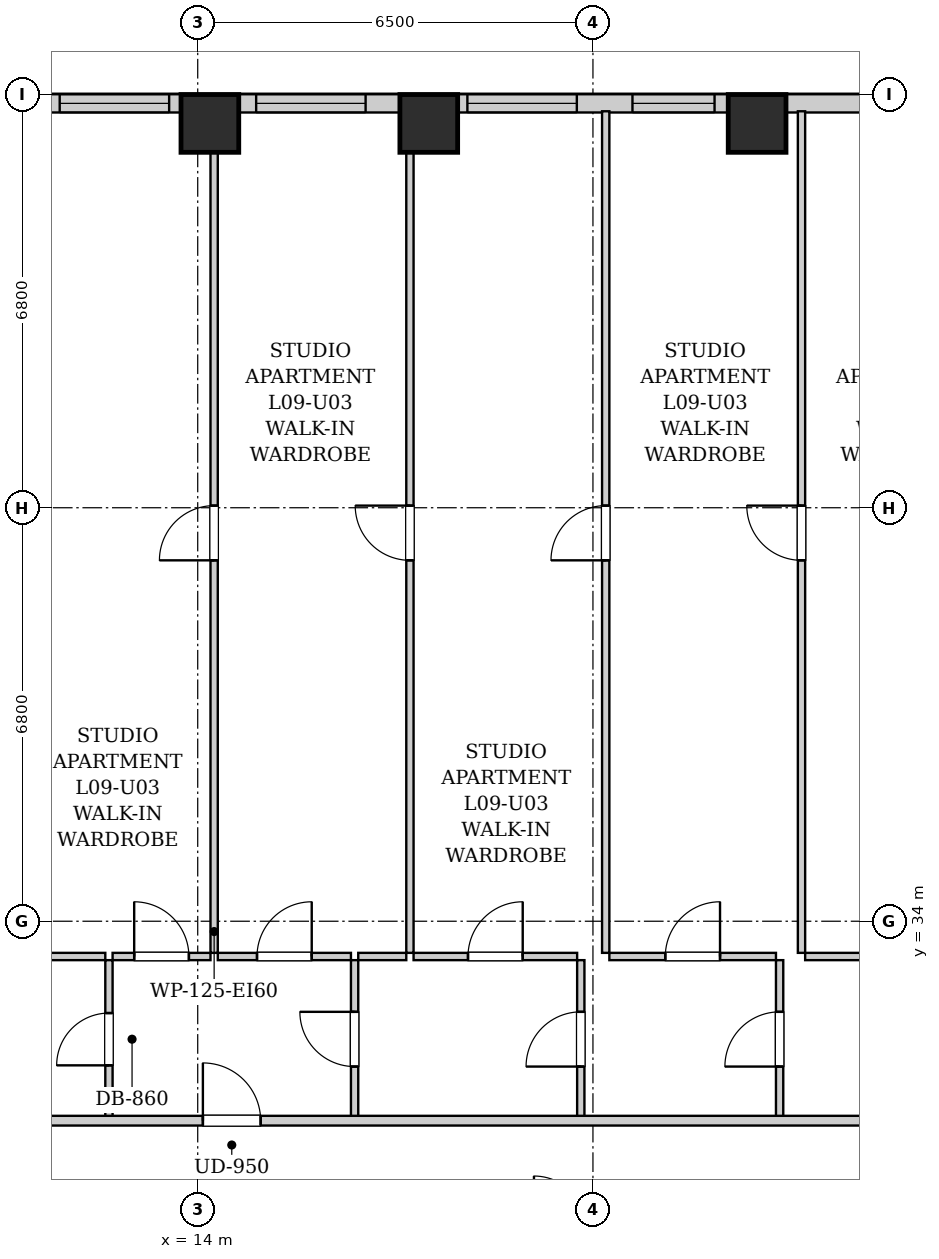
"""IFC4 building model, lengths in metres.
Left out: names, types, materials, properties, quantities, classifications, styles, units other than length and angle.
Written with IfcOpenShell. Run it as: python <this file> out.ifc"""

import sys

from ifc_helpers import new_model, si_unit, direction, frame, frame_2d, origin, origin_2d, place, context, subcontext, project, spatial, rectangle, extrude, element, fill, save


model = new_model("IFC4")
c1 = context("Model", 3, precision=1e-05, world=origin(), true_north=direction((0.0, 1.0)))
c2 = subcontext(c1, "Body", "Model", "MODEL_VIEW")
j1 = project(units=[si_unit("LENGTHUNIT", "METRE"), si_unit("PLANEANGLEUNIT", "RADIAN")], contexts=[c1])
p1 = place(None, origin())
s1 = spatial("IfcSite", under=j1, at=p1, CompositionType="ELEMENT")
p2 = place(p1, origin())
s2 = spatial("IfcBuilding", under=s1, at=p2, CompositionType="ELEMENT")
p3 = place(p2, frame((0.0, 0.0, 38.6)))
s3 = spatial("IfcBuildingStorey", under=s2, at=p3, CompositionType="ELEMENT", Elevation=38.6)
for number, where, z_axis, x_axis in (
    (1, (14.2, 47.12, 0.0), (0.0, 0.0, 1.0), (1.0, 0.0, 0.0)),
    (2, (17.8, 47.12, 0.0), (0.0, 0.0, 1.0), (1.0, 0.0, 0.0)),
    (3, (23.2, 47.12, 0.0), (0.0, 0.0, 1.0), (1.0, 0.0, 0.0)),
):
    element("IfcColumn", number, at=place(p3, frame(where, z_axis=z_axis, x_axis=x_axis)), inside=s3, PredefinedType="COLUMN", context=c2, shape_type="SweptSolid", body=[
        extrude(rectangle(XDim=0.95, YDim=0.95, at=origin_2d()), origin(), (0.0, 0.0, 1.0), 3.2),
    ])
p4 = place(p3, frame((10.0, 47.45, 0.0), z_axis=(0.0, 0.0, 1.0), x_axis=(1.0, 0.0, 0.0)))
e4 = element("IfcWall", 4, at=p4, inside=s3, PredefinedType="SOLIDWALL", context=c2, shape_type="SweptSolid", body=[
    extrude(rectangle(XDim=25.7, YDim=0.3, at=frame_2d((12.85, 0.0))), origin(), (0.0, 0.0, 1.0), 1.975),
])
p5 = place(p4, frame((1.73, 0.0, 0.55)))
e5 = element("IfcOpeningElement", 5, at=p5, cuts=e4, PredefinedType="OPENING", context=c2, shape_type="SweptSolid", body=[
    extrude(rectangle(XDim=1.8, YDim=1.2, at=frame_2d((0.9, 0.6))), frame((0.0, 0.16, 0.0), z_axis=(0.0, -1.0, 0.0), x_axis=(1.0, 0.0, 0.0)), (0.0, 0.0, 1.0), 0.32),
])
p6 = place(p4, frame((4.961, 0.0, 0.55)))
e6 = element("IfcOpeningElement", 6, at=p6, cuts=e4, PredefinedType="OPENING", context=c2, shape_type="SweptSolid", body=[
    extrude(rectangle(XDim=1.8, YDim=1.2, at=frame_2d((0.9, 0.6))), frame((0.0, 0.16, 0.0), z_axis=(0.0, -1.0, 0.0), x_axis=(1.0, 0.0, 0.0)), (0.0, 0.0, 1.0), 0.32),
])
p7 = place(p4, frame((8.435, 0.0, 0.55)))
e7 = element("IfcOpeningElement", 7, at=p7, cuts=e4, PredefinedType="OPENING", context=c2, shape_type="SweptSolid", body=[
    extrude(rectangle(XDim=1.8, YDim=1.2, at=frame_2d((0.9, 0.6))), frame((0.0, 0.16, 0.0), z_axis=(0.0, -1.0, 0.0), x_axis=(1.0, 0.0, 0.0)), (0.0, 0.0, 1.0), 0.32),
])
p8 = place(p4, frame((11.15, 0.0, 0.55)))
e8 = element("IfcOpeningElement", 8, at=p8, cuts=e4, PredefinedType="OPENING", context=c2, shape_type="SweptSolid", body=[
    extrude(rectangle(XDim=1.35, YDim=1.2, at=frame_2d((0.675, 0.6))), frame((0.0, 0.16, 0.0), z_axis=(0.0, -1.0, 0.0), x_axis=(1.0, 0.0, 0.0)), (0.0, 0.0, 1.0), 0.32),
])
p9 = place(p4, frame((17.812, 0.0, 0.55)))
e9 = element("IfcOpeningElement", 9, at=p9, cuts=e4, PredefinedType="OPENING", context=c2, shape_type="SweptSolid", body=[
    extrude(rectangle(XDim=1.8, YDim=1.2, at=frame_2d((0.9, 0.6))), frame((0.0, 0.16, 0.0), z_axis=(0.0, -1.0, 0.0), x_axis=(1.0, 0.0, 0.0)), (0.0, 0.0, 1.0), 0.32),
])
p10 = place(p4, frame((20.765, 0.0, 0.55)))
e10 = element("IfcOpeningElement", 10, at=p10, cuts=e4, PredefinedType="OPENING", context=c2, shape_type="SweptSolid", body=[
    extrude(rectangle(XDim=1.8, YDim=1.2, at=frame_2d((0.9, 0.6))), frame((0.0, 0.16, 0.0), z_axis=(0.0, -1.0, 0.0), x_axis=(1.0, 0.0, 0.0)), (0.0, 0.0, 1.0), 0.32),
])
p11 = place(p4, frame((23.835, 0.0, 0.55)))
e11 = element("IfcOpeningElement", 11, at=p11, cuts=e4, PredefinedType="OPENING", context=c2, shape_type="SweptSolid", body=[
    extrude(rectangle(XDim=1.35, YDim=1.2, at=frame_2d((0.675, 0.6))), frame((0.0, 0.16, 0.0), z_axis=(0.0, -1.0, 0.0), x_axis=(1.0, 0.0, 0.0)), (0.0, 0.0, 1.0), 0.32),
])
p12 = place(p3, frame((12.54, 30.76, 0.0), z_axis=(0.0, 0.0, 1.0), x_axis=(0.0, 1.0, 0.0)))
e12 = element("IfcWall", 12, at=p12, inside=s3, PredefinedType="PARTITIONING", context=c2, shape_type="SweptSolid", body=[
    extrude(rectangle(XDim=2.6, YDim=0.12, at=frame_2d((1.3, 0.0))), origin(), (0.0, 0.0, 1.0), 2.94),
])
p13 = place(p12, frame((0.87, 0.0, 0.0)))
e13 = element("IfcOpeningElement", 13, at=p13, cuts=e12, PredefinedType="OPENING", context=c2, shape_type="SweptSolid", body=[
    extrude(rectangle(XDim=0.86, YDim=2.05, at=frame_2d((0.43, 1.025))), frame((0.0, 0.07, 0.0), z_axis=(0.0, -1.0, 0.0), x_axis=(1.0, 0.0, 0.0)), (0.0, 0.0, 1.0), 0.14),
])
p14 = place(p3, frame((11.11, 33.42, 0.0), z_axis=(0.0, 0.0, 1.0), x_axis=(1.0, 0.0, 0.0)))
e14 = element("IfcWall", 14, at=p14, inside=s3, PredefinedType="PARTITIONING", context=c2, shape_type="SweptSolid", body=[
    extrude(rectangle(XDim=1.37, YDim=0.12, at=frame_2d((0.685, 0.0))), origin(), (0.0, 0.0, 1.0), 2.94),
])
p15 = place(p3, frame((16.58, 30.76, 0.0), z_axis=(0.0, 0.0, 1.0), x_axis=(0.0, 1.0, 0.0)))
e15 = element("IfcWall", 15, at=p15, inside=s3, PredefinedType="PARTITIONING", context=c2, shape_type="SweptSolid", body=[
    extrude(rectangle(XDim=2.6, YDim=0.12, at=frame_2d((1.3, 0.0))), origin(), (0.0, 0.0, 1.0), 2.94),
])
p16 = place(p15, frame((0.85, 0.0, 0.0)))
e16 = element("IfcOpeningElement", 16, at=p16, cuts=e15, PredefinedType="OPENING", context=c2, shape_type="SweptSolid", body=[
    extrude(rectangle(XDim=0.9, YDim=2.05, at=frame_2d((0.45, 1.025))), frame((0.0, 0.07, 0.0), z_axis=(0.0, -1.0, 0.0), x_axis=(1.0, 0.0, 0.0)), (0.0, 0.0, 1.0), 0.14),
])
p17 = place(p3, frame((12.6, 33.42, 0.0), z_axis=(0.0, 0.0, 1.0), x_axis=(1.0, 0.0, 0.0)))
e17 = element("IfcWall", 17, at=p17, inside=s3, PredefinedType="PARTITIONING", context=c2, shape_type="SweptSolid", body=[
    extrude(rectangle(XDim=1.61, YDim=0.12, at=frame_2d((0.805, 0.0))), origin(), (0.0, 0.0, 1.0), 2.94),
])
p18 = place(p17, frame((0.355, 0.0, 0.0)))
e18 = element("IfcOpeningElement", 18, at=p18, cuts=e17, PredefinedType="OPENING", context=c2, shape_type="SweptSolid", body=[
    extrude(rectangle(XDim=0.9, YDim=2.05, at=frame_2d((0.45, 1.025))), frame((0.0, 0.07, 0.0), z_axis=(0.0, -1.0, 0.0), x_axis=(1.0, 0.0, 0.0)), (0.0, 0.0, 1.0), 0.14),
])
p19 = place(p3, frame((14.33, 33.42, 0.0), z_axis=(0.0, 0.0, 1.0), x_axis=(1.0, 0.0, 0.0)))
e19 = element("IfcWall", 19, at=p19, inside=s3, PredefinedType="PARTITIONING", context=c2, shape_type="SweptSolid", body=[
    extrude(rectangle(XDim=2.19, YDim=0.12, at=frame_2d((1.095, 0.0))), origin(), (0.0, 0.0, 1.0), 2.94),
])
p20 = place(p19, frame((0.645, 0.0, 0.0)))
e20 = element("IfcOpeningElement", 20, at=p20, cuts=e19, PredefinedType="OPENING", context=c2, shape_type="SweptSolid", body=[
    extrude(rectangle(XDim=0.9, YDim=2.05, at=frame_2d((0.45, 1.025))), frame((0.0, 0.07, 0.0), z_axis=(0.0, -1.0, 0.0), x_axis=(1.0, 0.0, 0.0)), (0.0, 0.0, 1.0), 0.14),
])
p21 = place(p3, frame((20.3, 30.76, 0.0), z_axis=(0.0, 0.0, 1.0), x_axis=(0.0, 1.0, 0.0)))
e21 = element("IfcWall", 21, at=p21, inside=s3, PredefinedType="PARTITIONING", context=c2, shape_type="SweptSolid", body=[
    extrude(rectangle(XDim=2.6, YDim=0.12, at=frame_2d((1.3, 0.0))), origin(), (0.0, 0.0, 1.0), 2.94),
])
p22 = place(p21, frame((0.85, 0.0, 0.0)))
e22 = element("IfcOpeningElement", 22, at=p22, cuts=e21, PredefinedType="OPENING", context=c2, shape_type="SweptSolid", body=[
    extrude(rectangle(XDim=0.9, YDim=2.05, at=frame_2d((0.45, 1.025))), frame((0.0, 0.07, 0.0), z_axis=(0.0, -1.0, 0.0), x_axis=(1.0, 0.0, 0.0)), (0.0, 0.0, 1.0), 0.14),
])
p23 = place(p3, frame((16.64, 33.42, 0.0), z_axis=(0.0, 0.0, 1.0), x_axis=(1.0, 0.0, 0.0)))
e23 = element("IfcWall", 23, at=p23, inside=s3, PredefinedType="PARTITIONING", context=c2, shape_type="SweptSolid", body=[
    extrude(rectangle(XDim=0.79, YDim=0.12, at=frame_2d((0.395, 0.0))), origin(), (0.0, 0.0, 1.0), 2.94),
])
p24 = place(p3, frame((17.55, 33.42, 0.0), z_axis=(0.0, 0.0, 1.0), x_axis=(1.0, 0.0, 0.0)))
e24 = element("IfcWall", 24, at=p24, inside=s3, PredefinedType="PARTITIONING", context=c2, shape_type="SweptSolid", body=[
    extrude(rectangle(XDim=2.69, YDim=0.12, at=frame_2d((1.345, 0.0))), origin(), (0.0, 0.0, 1.0), 2.94),
])
p25 = place(p24, frame((0.895, 0.0, 0.0)))
e25 = element("IfcOpeningElement", 25, at=p25, cuts=e24, PredefinedType="OPENING", context=c2, shape_type="SweptSolid", body=[
    extrude(rectangle(XDim=0.9, YDim=2.05, at=frame_2d((0.45, 1.025))), frame((0.0, 0.07, 0.0), z_axis=(0.0, -1.0, 0.0), x_axis=(1.0, 0.0, 0.0)), (0.0, 0.0, 1.0), 0.14),
])
p26 = place(p3, frame((23.57, 30.76, 0.0), z_axis=(0.0, 0.0, 1.0), x_axis=(0.0, 1.0, 0.0)))
e26 = element("IfcWall", 26, at=p26, inside=s3, PredefinedType="PARTITIONING", context=c2, shape_type="SweptSolid", body=[
    extrude(rectangle(XDim=2.6, YDim=0.12, at=frame_2d((1.3, 0.0))), origin(), (0.0, 0.0, 1.0), 2.94),
])
p27 = place(p26, frame((0.85, 0.0, 0.0)))
e27 = element("IfcOpeningElement", 27, at=p27, cuts=e26, PredefinedType="OPENING", context=c2, shape_type="SweptSolid", body=[
    extrude(rectangle(XDim=0.9, YDim=2.05, at=frame_2d((0.45, 1.025))), frame((0.0, 0.07, 0.0), z_axis=(0.0, -1.0, 0.0), x_axis=(1.0, 0.0, 0.0)), (0.0, 0.0, 1.0), 0.14),
])
p28 = place(p3, frame((20.77, 33.42, 0.0), z_axis=(0.0, 0.0, 1.0), x_axis=(1.0, 0.0, 0.0)))
e28 = element("IfcWall", 28, at=p28, inside=s3, PredefinedType="PARTITIONING", context=c2, shape_type="SweptSolid", body=[
    extrude(rectangle(XDim=2.74, YDim=0.12, at=frame_2d((1.37, 0.0))), origin(), (0.0, 0.0, 1.0), 2.94),
])
p29 = place(p28, frame((0.92, 0.0, 0.0)))
e29 = element("IfcOpeningElement", 29, at=p29, cuts=e28, PredefinedType="OPENING", context=c2, shape_type="SweptSolid", body=[
    extrude(rectangle(XDim=0.9, YDim=2.05, at=frame_2d((0.45, 1.025))), frame((0.0, 0.07, 0.0), z_axis=(0.0, -1.0, 0.0), x_axis=(1.0, 0.0, 0.0)), (0.0, 0.0, 1.0), 0.14),
])
p30 = place(p3, frame((23.99, 33.42, 0.0), z_axis=(0.0, 0.0, 1.0), x_axis=(1.0, 0.0, 0.0)))
e30 = element("IfcWall", 30, at=p30, inside=s3, PredefinedType="PARTITIONING", context=c2, shape_type="SweptSolid", body=[
    extrude(rectangle(XDim=3.1, YDim=0.12, at=frame_2d((1.55, 0.0))), origin(), (0.0, 0.0, 1.0), 2.94),
])
p31 = place(p30, frame((1.1, 0.0, 0.0)))
e31 = element("IfcOpeningElement", 31, at=p31, cuts=e30, PredefinedType="OPENING", context=c2, shape_type="SweptSolid", body=[
    extrude(rectangle(XDim=0.9, YDim=2.05, at=frame_2d((0.45, 1.025))), frame((0.0, 0.07, 0.0), z_axis=(0.0, -1.0, 0.0), x_axis=(1.0, 0.0, 0.0)), (0.0, 0.0, 1.0), 0.14),
])
p32 = place(p3, frame((14.27, 33.48, 0.0), z_axis=(0.0, 0.0, 1.0), x_axis=(0.0, 1.0, 0.0)))
e32 = element("IfcWall", 32, at=p32, inside=s3, PredefinedType="PARTITIONING", context=c2, shape_type="SweptSolid", body=[
    extrude(rectangle(XDim=13.84, YDim=0.12, at=frame_2d((6.92, 0.0))), origin(), (0.0, 0.0, 1.0), 2.94),
])
p33 = place(p32, frame((6.455, 0.0, 0.0)))
e33 = element("IfcOpeningElement", 33, at=p33, cuts=e32, PredefinedType="OPENING", context=c2, shape_type="SweptSolid", body=[
    extrude(rectangle(XDim=0.9, YDim=2.05, at=frame_2d((0.45, 1.025))), frame((0.0, 0.07, 0.0), z_axis=(0.0, -1.0, 0.0), x_axis=(1.0, 0.0, 0.0)), (0.0, 0.0, 1.0), 0.14),
])
p34 = place(p3, frame((17.49, 33.48, 0.0), z_axis=(0.0, 0.0, 1.0), x_axis=(0.0, 1.0, 0.0)))
e34 = element("IfcWall", 34, at=p34, inside=s3, PredefinedType="PARTITIONING", context=c2, shape_type="SweptSolid", body=[
    extrude(rectangle(XDim=13.84, YDim=0.12, at=frame_2d((6.92, 0.0))), origin(), (0.0, 0.0, 1.0), 2.94),
])
p35 = place(p34, frame((6.455, 0.0, 0.0)))
e35 = element("IfcOpeningElement", 35, at=p35, cuts=e34, PredefinedType="OPENING", context=c2, shape_type="SweptSolid", body=[
    extrude(rectangle(XDim=0.9, YDim=2.05, at=frame_2d((0.45, 1.025))), frame((0.0, 0.07, 0.0), z_axis=(0.0, -1.0, 0.0), x_axis=(1.0, 0.0, 0.0)), (0.0, 0.0, 1.0), 0.14),
])
p36 = place(p3, frame((20.71, 33.48, 0.0), z_axis=(0.0, 0.0, 1.0), x_axis=(0.0, 1.0, 0.0)))
e36 = element("IfcWall", 36, at=p36, inside=s3, PredefinedType="PARTITIONING", context=c2, shape_type="SweptSolid", body=[
    extrude(rectangle(XDim=13.84, YDim=0.12, at=frame_2d((6.92, 0.0))), origin(), (0.0, 0.0, 1.0), 2.94),
])
p37 = place(p36, frame((6.455, 0.0, 0.0)))
e37 = element("IfcOpeningElement", 37, at=p37, cuts=e36, PredefinedType="OPENING", context=c2, shape_type="SweptSolid", body=[
    extrude(rectangle(XDim=0.9, YDim=2.05, at=frame_2d((0.45, 1.025))), frame((0.0, 0.07, 0.0), z_axis=(0.0, -1.0, 0.0), x_axis=(1.0, 0.0, 0.0)), (0.0, 0.0, 1.0), 0.14),
])
p38 = place(p3, frame((23.93, 33.48, 0.0), z_axis=(0.0, 0.0, 1.0), x_axis=(0.0, 1.0, 0.0)))
e38 = element("IfcWall", 38, at=p38, inside=s3, PredefinedType="PARTITIONING", context=c2, shape_type="SweptSolid", body=[
    extrude(rectangle(XDim=13.84, YDim=0.12, at=frame_2d((6.92, 0.0))), origin(), (0.0, 0.0, 1.0), 2.94),
])
p39 = place(p38, frame((6.455, 0.0, 0.0)))
e39 = element("IfcOpeningElement", 39, at=p39, cuts=e38, PredefinedType="OPENING", context=c2, shape_type="SweptSolid", body=[
    extrude(rectangle(XDim=0.9, YDim=2.05, at=frame_2d((0.45, 1.025))), frame((0.0, 0.07, 0.0), z_axis=(0.0, -1.0, 0.0), x_axis=(1.0, 0.0, 0.0)), (0.0, 0.0, 1.0), 0.14),
])
p40 = place(p3, frame((10.05, 30.72, 0.0), z_axis=(0.0, 0.0, 1.0), x_axis=(1.0, 0.0, 0.0)))
e40 = element("IfcWall", 40, at=p40, inside=s3, PredefinedType="PARTITIONING", context=c2, shape_type="SweptSolid", body=[
    extrude(rectangle(XDim=33.9, YDim=0.16, at=frame_2d((16.95, 0.0))), origin(), (0.0, 0.0, 1.0), 2.94),
])
p41 = place(p40, frame((4.035, 0.0, 0.0)))
e41 = element("IfcOpeningElement", 41, at=p41, cuts=e40, PredefinedType="OPENING", context=c2, shape_type="SweptSolid", body=[
    extrude(rectangle(XDim=0.95, YDim=2.1, at=frame_2d((0.475, 1.05))), frame((0.0, 0.09, 0.0), z_axis=(0.0, -1.0, 0.0), x_axis=(1.0, 0.0, 0.0)), (0.0, 0.0, 1.0), 0.18),
])
p42 = place(p13, origin())
e42 = element("IfcDoor", 42, at=p42, inside=s3, OperationType="SINGLE_SWING_LEFT", PredefinedType="DOOR", context=c2, shape_type="SweptSolid", body=[
    extrude(rectangle(XDim=0.86, YDim=2.05, at=frame_2d((0.43, 1.025))), frame((0.0, 0.025, 0.0), z_axis=(0.0, -1.0, 0.0), x_axis=(1.0, 0.0, 0.0)), (0.0, 0.0, 1.0), 0.05),
])
fill(e13, e42)
p43 = place(p16, origin())
e43 = element("IfcDoor", 43, at=p43, inside=s3, OperationType="SINGLE_SWING_RIGHT", PredefinedType="DOOR", context=c2, shape_type="SweptSolid", body=[
    extrude(rectangle(XDim=0.9, YDim=2.05, at=frame_2d((0.45, 1.025))), frame((0.0, 0.025, 0.0), z_axis=(0.0, -1.0, 0.0), x_axis=(1.0, 0.0, 0.0)), (0.0, 0.0, 1.0), 0.05),
])
fill(e16, e43)
p44 = place(p18, origin())
e44 = element("IfcDoor", 44, at=p44, inside=s3, OperationType="SINGLE_SWING_LEFT", PredefinedType="DOOR", context=c2, shape_type="SweptSolid", body=[
    extrude(rectangle(XDim=0.9, YDim=2.05, at=frame_2d((0.45, 1.025))), frame((0.0, 0.025, 0.0), z_axis=(0.0, -1.0, 0.0), x_axis=(1.0, 0.0, 0.0)), (0.0, 0.0, 1.0), 0.05),
])
fill(e18, e44)
p45 = place(p20, origin())
e45 = element("IfcDoor", 45, at=p45, inside=s3, OperationType="SINGLE_SWING_RIGHT", PredefinedType="DOOR", context=c2, shape_type="SweptSolid", body=[
    extrude(rectangle(XDim=0.9, YDim=2.05, at=frame_2d((0.45, 1.025))), frame((0.0, 0.025, 0.0), z_axis=(0.0, -1.0, 0.0), x_axis=(1.0, 0.0, 0.0)), (0.0, 0.0, 1.0), 0.05),
])
fill(e20, e45)
p46 = place(p22, origin())
e46 = element("IfcDoor", 46, at=p46, inside=s3, OperationType="SINGLE_SWING_LEFT", PredefinedType="DOOR", context=c2, shape_type="SweptSolid", body=[
    extrude(rectangle(XDim=0.9, YDim=2.05, at=frame_2d((0.45, 1.025))), frame((0.0, 0.025, 0.0), z_axis=(0.0, -1.0, 0.0), x_axis=(1.0, 0.0, 0.0)), (0.0, 0.0, 1.0), 0.05),
])
fill(e22, e46)
p47 = place(p25, origin())
e47 = element("IfcDoor", 47, at=p47, inside=s3, OperationType="SINGLE_SWING_RIGHT", PredefinedType="DOOR", context=c2, shape_type="SweptSolid", body=[
    extrude(rectangle(XDim=0.9, YDim=2.05, at=frame_2d((0.45, 1.025))), frame((0.0, 0.025, 0.0), z_axis=(0.0, -1.0, 0.0), x_axis=(1.0, 0.0, 0.0)), (0.0, 0.0, 1.0), 0.05),
])
fill(e25, e47)
p48 = place(p27, origin())
e48 = element("IfcDoor", 48, at=p48, inside=s3, OperationType="SINGLE_SWING_LEFT", PredefinedType="DOOR", context=c2, shape_type="SweptSolid", body=[
    extrude(rectangle(XDim=0.9, YDim=2.05, at=frame_2d((0.45, 1.025))), frame((0.0, 0.025, 0.0), z_axis=(0.0, -1.0, 0.0), x_axis=(1.0, 0.0, 0.0)), (0.0, 0.0, 1.0), 0.05),
])
fill(e27, e48)
p49 = place(p29, origin())
e49 = element("IfcDoor", 49, at=p49, inside=s3, OperationType="SINGLE_SWING_RIGHT", PredefinedType="DOOR", context=c2, shape_type="SweptSolid", body=[
    extrude(rectangle(XDim=0.9, YDim=2.05, at=frame_2d((0.45, 1.025))), frame((0.0, 0.025, 0.0), z_axis=(0.0, -1.0, 0.0), x_axis=(1.0, 0.0, 0.0)), (0.0, 0.0, 1.0), 0.05),
])
fill(e29, e49)
p50 = place(p33, origin())
e50 = element("IfcDoor", 50, at=p50, inside=s3, OperationType="SINGLE_SWING_LEFT", PredefinedType="DOOR", context=c2, shape_type="SweptSolid", body=[
    extrude(rectangle(XDim=0.9, YDim=2.05, at=frame_2d((0.45, 1.025))), frame((0.0, 0.025, 0.0), z_axis=(0.0, -1.0, 0.0), x_axis=(1.0, 0.0, 0.0)), (0.0, 0.0, 1.0), 0.05),
])
fill(e33, e50)
p51 = place(p35, origin())
e51 = element("IfcDoor", 51, at=p51, inside=s3, OperationType="SINGLE_SWING_RIGHT", PredefinedType="DOOR", context=c2, shape_type="SweptSolid", body=[
    extrude(rectangle(XDim=0.9, YDim=2.05, at=frame_2d((0.45, 1.025))), frame((0.0, 0.025, 0.0), z_axis=(0.0, -1.0, 0.0), x_axis=(1.0, 0.0, 0.0)), (0.0, 0.0, 1.0), 0.05),
])
fill(e35, e51)
p52 = place(p37, origin())
e52 = element("IfcDoor", 52, at=p52, inside=s3, OperationType="SINGLE_SWING_LEFT", PredefinedType="DOOR", context=c2, shape_type="SweptSolid", body=[
    extrude(rectangle(XDim=0.9, YDim=2.05, at=frame_2d((0.45, 1.025))), frame((0.0, 0.025, 0.0), z_axis=(0.0, -1.0, 0.0), x_axis=(1.0, 0.0, 0.0)), (0.0, 0.0, 1.0), 0.05),
])
fill(e37, e52)
p53 = place(p39, origin())
e53 = element("IfcDoor", 53, at=p53, inside=s3, OperationType="SINGLE_SWING_RIGHT", PredefinedType="DOOR", context=c2, shape_type="SweptSolid", body=[
    extrude(rectangle(XDim=0.9, YDim=2.05, at=frame_2d((0.45, 1.025))), frame((0.0, 0.025, 0.0), z_axis=(0.0, -1.0, 0.0), x_axis=(1.0, 0.0, 0.0)), (0.0, 0.0, 1.0), 0.05),
])
fill(e39, e53)
p54 = place(p41, origin())
e54 = element("IfcDoor", 54, at=p54, inside=s3, OperationType="SINGLE_SWING_LEFT", PredefinedType="DOOR", context=c2, shape_type="SweptSolid", body=[
    extrude(rectangle(XDim=0.95, YDim=2.1, at=frame_2d((0.475, 1.05))), frame((0.0, 0.025, 0.0), z_axis=(0.0, -1.0, 0.0), x_axis=(1.0, 0.0, 0.0)), (0.0, 0.0, 1.0), 0.05),
])
fill(e41, e54)
p55 = place(p5, origin())
e55 = element("IfcWindow", 55, at=p55, inside=s3, PartitioningType="DOUBLE_PANEL_VERTICAL", PredefinedType="WINDOW", context=c2, shape_type="SweptSolid", body=[
    extrude(rectangle(XDim=1.8, YDim=1.2, at=frame_2d((0.9, 0.6))), frame((0.0, 0.03, 0.0), z_axis=(0.0, -1.0, 0.0), x_axis=(1.0, 0.0, 0.0)), (0.0, 0.0, 1.0), 0.06),
])
fill(e5, e55)
p56 = place(p6, origin())
e56 = element("IfcWindow", 56, at=p56, inside=s3, PartitioningType="DOUBLE_PANEL_VERTICAL", PredefinedType="WINDOW", context=c2, shape_type="SweptSolid", body=[
    extrude(rectangle(XDim=1.8, YDim=1.2, at=frame_2d((0.9, 0.6))), frame((0.0, 0.03, 0.0), z_axis=(0.0, -1.0, 0.0), x_axis=(1.0, 0.0, 0.0)), (0.0, 0.0, 1.0), 0.06),
])
fill(e6, e56)
p57 = place(p7, origin())
e57 = element("IfcWindow", 57, at=p57, inside=s3, PartitioningType="DOUBLE_PANEL_VERTICAL", PredefinedType="WINDOW", context=c2, shape_type="SweptSolid", body=[
    extrude(rectangle(XDim=1.8, YDim=1.2, at=frame_2d((0.9, 0.6))), frame((0.0, 0.03, 0.0), z_axis=(0.0, -1.0, 0.0), x_axis=(1.0, 0.0, 0.0)), (0.0, 0.0, 1.0), 0.06),
])
fill(e7, e57)
p58 = place(p8, origin())
e58 = element("IfcWindow", 58, at=p58, inside=s3, PartitioningType="SINGLE_PANEL", PredefinedType="WINDOW", context=c2, shape_type="SweptSolid", body=[
    extrude(rectangle(XDim=1.35, YDim=1.2, at=frame_2d((0.675, 0.6))), frame((0.0, 0.03, 0.0), z_axis=(0.0, -1.0, 0.0), x_axis=(1.0, 0.0, 0.0)), (0.0, 0.0, 1.0), 0.06),
])
fill(e8, e58)
save(model, sys.argv[1])
